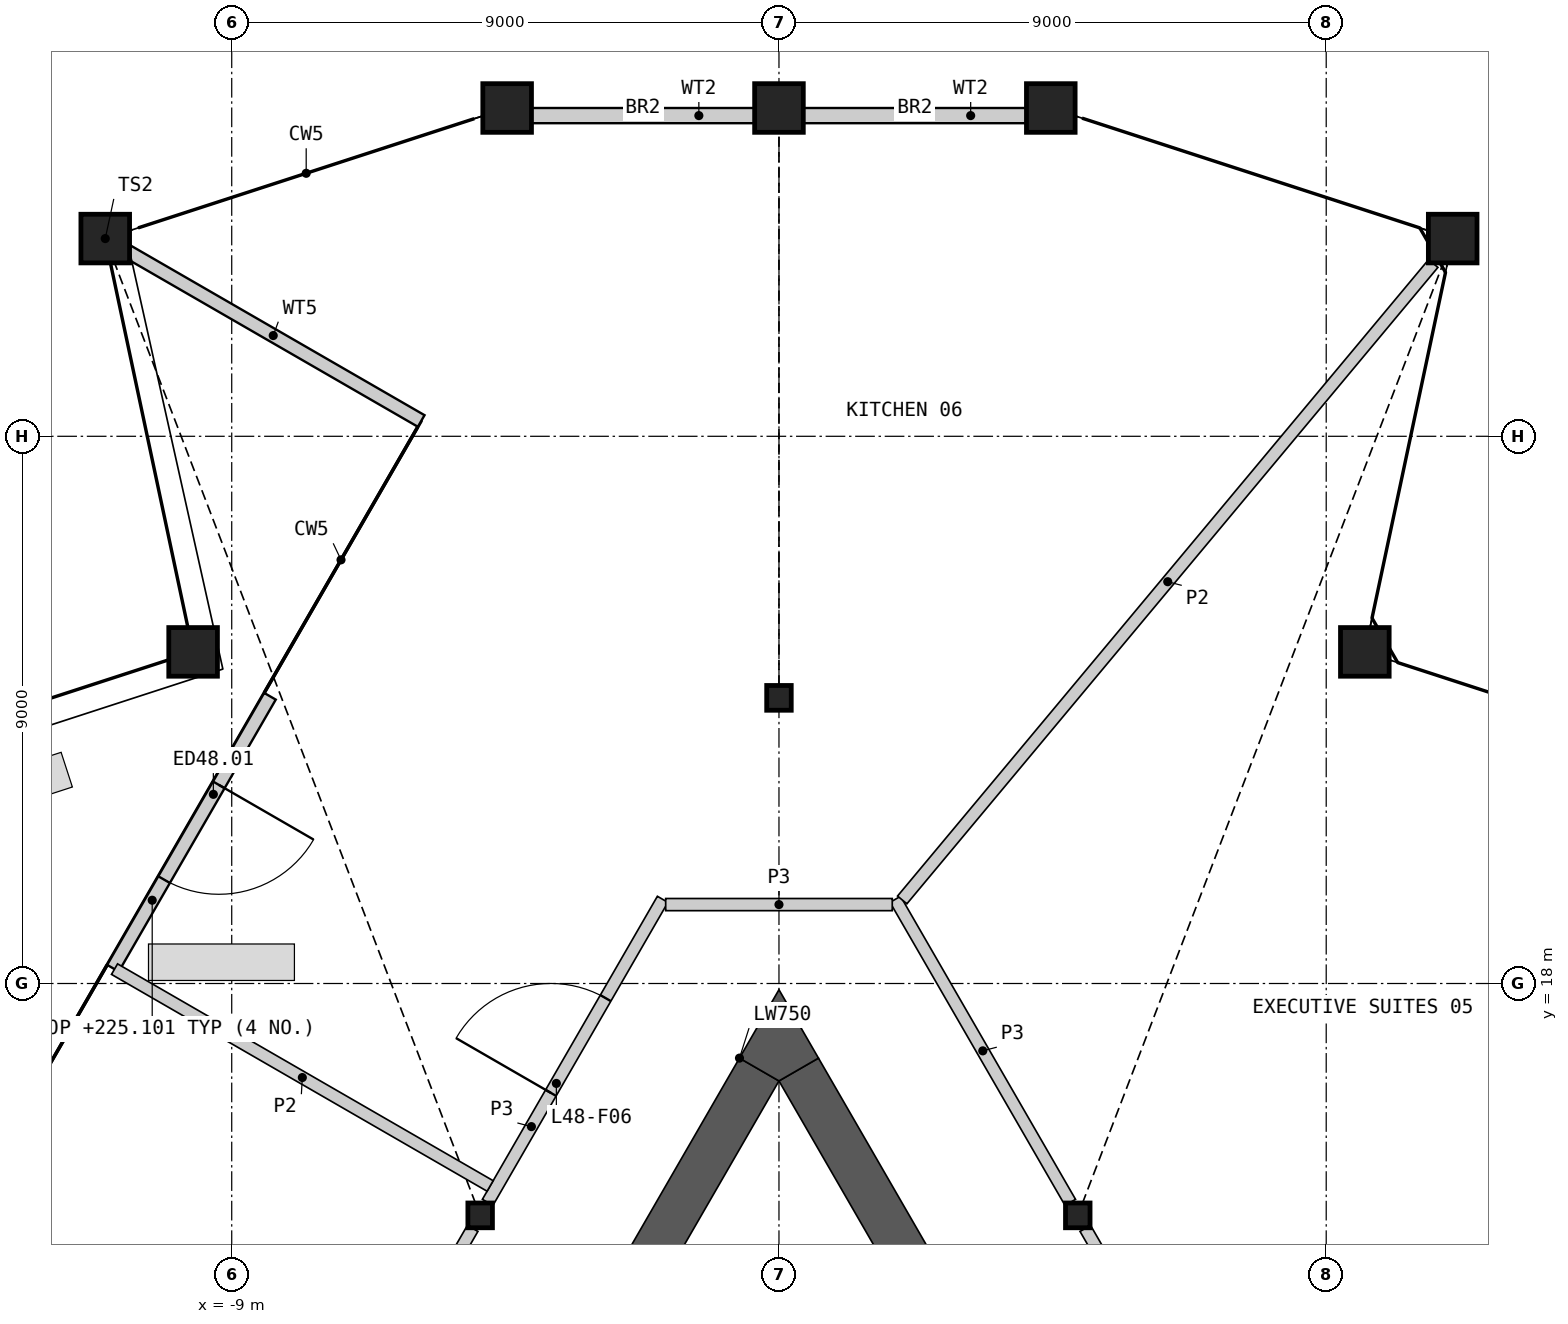
"""IFC4 building model, lengths in metres.
Left out: names, types, materials, properties, quantities, classifications, styles, units other than length and angle.
Written with IfcOpenShell. Run it as: python <this file> out.ifc"""

import sys

from ifc_helpers import new_model, si_unit, direction, frame, frame_2d, origin, origin_2d, place, context, subcontext, project, spatial, polyline, rectangle, hollow_rectangle, i_section, outline, extrude, element, fill, save


model = new_model("IFC4")
c1 = context("Model", 3, precision=1e-05, world=origin(), true_north=direction((0.0, 1.0)))
c2 = subcontext(c1, "Body", "Model", "MODEL_VIEW")
j1 = project(units=[si_unit("LENGTHUNIT", "METRE"), si_unit("PLANEANGLEUNIT", "RADIAN")], contexts=[c1])
p1 = place(None, origin())
s1 = spatial("IfcSite", under=j1, at=p1, CompositionType="ELEMENT")
p2 = place(p1, origin())
s2 = spatial("IfcBuilding", under=s1, at=p2, CompositionType="ELEMENT")
p3 = place(p2, frame((0.0, 0.0, 216.0)))
s3 = spatial("IfcBuildingStorey", under=s2, at=p3, CompositionType="ELEMENT", Elevation=216.0)
for number, where, z_axis, x_axis in (
    (1, (9.635, 23.454, 0.0), (0.0, 0.0, 1.0), (1.0, 0.0, 0.0)),
    (2, (11.08, 30.252, 0.0), (0.0, 0.0, 1.0), (1.0, 0.0, 0.0)),
    (3, (4.47, 32.399, 0.0), (0.0, 0.0, 1.0), (1.0, 0.0, 0.0)),
    (4, (0.0, 32.399, 0.0), (0.0, 0.0, 1.0), (1.0, 0.0, 0.0)),
    (5, (-4.47, 32.399, 0.0), (0.0, 0.0, 1.0), (1.0, 0.0, 0.0)),
    (6, (-11.08, 30.252, 0.0), (0.0, 0.0, 1.0), (1.0, 0.0, 0.0)),
    (7, (-9.635, 23.454, 0.0), (0.0, 0.0, 1.0), (1.0, 0.0, 0.0)),
):
    element("IfcColumn", number, at=place(p3, frame(where, z_axis=z_axis, x_axis=x_axis)), inside=s3, PredefinedType="COLUMN", context=c2, shape_type="SweptSolid", body=[
        extrude(hollow_rectangle(XDim=0.8, YDim=0.8, WallThickness=0.05, at=origin_2d()), origin(), (0.0, 0.0, 1.0), 10.0),
    ])
for number, where, z_axis, x_axis in (
    (8, (0.0, 22.698, 0.0), (0.0, 0.0, 1.0), (1.0, 0.0, 0.0)),
    (9, (-4.914, 14.186, 0.0), (0.0, 0.0, 1.0), (1.0, 0.0, 0.0)),
    (10, (4.914, 14.186, 0.0), (0.0, 0.0, 1.0), (1.0, 0.0, 0.0)),
):
    element("IfcColumn", number, at=place(p3, frame(where, z_axis=z_axis, x_axis=x_axis)), inside=s3, PredefinedType="COLUMN", context=c2, shape_type="SweptSolid", body=[
        extrude(i_section(OverallWidth=0.404, OverallDepth=0.407, WebThickness=0.027, FlangeThickness=0.044, at=origin_2d()), origin(), (0.0, 0.0, 1.0), 10.0),
    ])
for number, where, z_axis, x_axis in (
    (11, (4.07, 32.274, 0.0), (0.0, 0.0, 1.0), (-1.0, 0.0, 0.0)),
    (12, (-0.4, 32.274, 0.0), (0.0, 0.0, 1.0), (-1.0, 0.0, 0.0)),
):
    element("IfcWall", number, at=place(p3, frame(where, z_axis=z_axis, x_axis=x_axis)), inside=s3, PredefinedType="SOLIDWALL", context=c2, shape_type="SweptSolid", body=[
        extrude(rectangle(XDim=3.67, YDim=0.25, at=frame_2d((1.835, 0.0))), origin(), (0.0, 0.0, 1.0), 9.101),
    ])
p4 = place(p3, frame((-8.371, 22.724, 0.0), z_axis=(0.0, 0.0, 1.0), x_axis=(-0.499997981539, -0.86602656914, 0.0)))
e13 = element("IfcWall", 13, at=p4, inside=s3, PredefinedType="SOLIDWALL", context=c2, shape_type="SweptSolid", body=[
    extrude(rectangle(XDim=5.165, YDim=0.22, at=frame_2d((2.582, 0.0))), origin(), (0.0, 0.0, 1.0), 9.101),
])
p5 = place(p4, frame((1.682, 0.0, 0.0)))
e14 = element("IfcOpeningElement", 14, at=p5, cuts=e13, PredefinedType="OPENING", context=c2, shape_type="SweptSolid", body=[
    extrude(rectangle(XDim=1.8, YDim=2.4, at=frame_2d((0.9, 1.2))), frame((0.0, 0.12, 0.0), z_axis=(0.0, -1.0, 0.0), x_axis=(1.0, 0.0, 0.0)), (0.0, 0.0, 1.0), 0.24),
])
p6 = place(p3, frame((-10.751, 30.062, 0.0), z_axis=(0.0, 0.0, 1.0), x_axis=(0.866015577098, -0.500017019934, 0.0)))
e15 = element("IfcWall", 15, at=p6, inside=s3, PredefinedType="SOLIDWALL", context=c2, shape_type="SweptSolid", body=[
    extrude(rectangle(XDim=5.62, YDim=0.22, at=frame_2d((2.81, 0.0))), origin(), (0.0, 0.0, 1.0), 9.101),
])
p7 = place(p3, frame((2.169, 13.391, 0.0), z_axis=(0.0, 0.0, 1.0), x_axis=(-0.500018451642, 0.866014750462, 0.0)))
e16 = element("IfcWall", 16, at=p7, inside=s3, PredefinedType="SHEAR", context=c2, shape_type="SweptSolid", body=[
    extrude(rectangle(XDim=3.689, YDim=0.75, at=frame_2d((1.844, 0.0))), origin(), (0.0, 0.0, 1.0), 9.65),
])
p8 = place(p3, frame((-0.325, 16.585, 0.0), z_axis=(0.0, 0.0, 1.0), x_axis=(-0.500008939514, -0.866020242492, 0.0)))
e17 = element("IfcWall", 17, at=p8, inside=s3, PredefinedType="SHEAR", context=c2, shape_type="SweptSolid", body=[
    extrude(rectangle(XDim=11.901, YDim=0.75, at=frame_2d((5.951, 0.0))), origin(), (0.0, 0.0, 1.0), 9.65),
])
p9 = place(p3, origin())
e18 = element("IfcWall", 18, at=p9, inside=s3, PredefinedType="SHEAR", context=c2, shape_type="SweptSolid", body=[
    extrude(outline(polyline([(-0.649, 16.773), (0.0, 17.898), (0.649, 16.773), (0.0, 16.398), (-0.649, 16.773)])), origin(), (0.0, 0.0, 1.0), 9.65),
])
p10 = place(p3, frame((5.038, 13.972, 0.0), z_axis=(0.0, 0.0, 1.0), x_axis=(0.50000393355, -0.866023132736, 0.0)))
e19 = element("IfcWall", 19, at=p10, inside=s3, PredefinedType="PARTITIONING", context=c2, shape_type="SweptSolid", body=[
    extrude(rectangle(XDim=9.335, YDim=0.2, at=frame_2d((4.667, 0.0))), origin(), (0.0, 0.0, 1.0), 9.65),
])
p11 = place(p10, frame((3.768, 0.0, 0.0)))
e20 = element("IfcOpeningElement", 20, at=p11, cuts=e19, PredefinedType="OPENING", context=c2, shape_type="SweptSolid", body=[
    extrude(rectangle(XDim=1.8, YDim=2.1, at=frame_2d((0.9, 1.05))), frame((0.0, 0.11, 0.0), z_axis=(0.0, -1.0, 0.0), x_axis=(1.0, 0.0, 0.0)), (0.0, 0.0, 1.0), 0.22),
])
p12 = place(p3, frame((-9.705, 5.888, 0.0), z_axis=(0.0, 0.0, 1.0), x_axis=(0.50000393355, 0.866023132736, 0.0)))
e21 = element("IfcWall", 21, at=p12, inside=s3, PredefinedType="PARTITIONING", context=c2, shape_type="SweptSolid", body=[
    extrude(rectangle(XDim=9.335, YDim=0.2, at=frame_2d((4.667, 0.0))), origin(), (0.0, 0.0, 1.0), 9.65),
])
p13 = place(p12, frame((3.768, 0.0, 0.0)))
e22 = element("IfcOpeningElement", 22, at=p13, cuts=e21, PredefinedType="OPENING", context=c2, shape_type="SweptSolid", body=[
    extrude(rectangle(XDim=1.8, YDim=2.1, at=frame_2d((0.9, 1.05))), frame((0.0, 0.11, 0.0), z_axis=(0.0, -1.0, 0.0), x_axis=(1.0, 0.0, 0.0)), (0.0, 0.0, 1.0), 0.22),
])
p14 = place(p3, frame((-4.791, 14.4, 0.0), z_axis=(0.0, 0.0, 1.0), x_axis=(0.50000762079, 0.866021003874, 0.0)))
e23 = element("IfcWall", 23, at=p14, inside=s3, PredefinedType="PARTITIONING", context=c2, shape_type="SweptSolid", body=[
    extrude(rectangle(XDim=5.756, YDim=0.2, at=frame_2d((2.878, 0.0))), origin(), (0.0, 0.0, 1.0), 9.65),
])
p15 = place(p14, frame((2.08, 0.0, 0.0)))
e24 = element("IfcOpeningElement", 24, at=p15, cuts=e23, PredefinedType="OPENING", context=c2, shape_type="SweptSolid", body=[
    extrude(rectangle(XDim=1.8, YDim=2.1, at=frame_2d((0.9, 1.05))), frame((0.0, 0.11, 0.0), z_axis=(0.0, -1.0, 0.0), x_axis=(1.0, 0.0, 0.0)), (0.0, 0.0, 1.0), 0.22),
])
p16 = place(p3, frame((1.913, 19.385, 0.0), z_axis=(0.0, 0.0, 1.0), x_axis=(0.50000762079, -0.866021003874, 0.0)))
e25 = element("IfcWall", 25, at=p16, inside=s3, PredefinedType="PARTITIONING", context=c2, shape_type="SweptSolid", body=[
    extrude(rectangle(XDim=5.756, YDim=0.2, at=frame_2d((2.878, 0.0))), origin(), (0.0, 0.0, 1.0), 9.65),
])
p17 = place(p3, frame((-1.863, 19.298, 0.0), z_axis=(0.0, 0.0, 1.0), x_axis=(1.0, 0.0, 0.0)))
e26 = element("IfcWall", 26, at=p17, inside=s3, PredefinedType="PARTITIONING", context=c2, shape_type="SweptSolid", body=[
    extrude(rectangle(XDim=3.726, YDim=0.2, at=frame_2d((1.863, 0.0))), origin(), (0.0, 0.0, 1.0), 9.65),
])
p18 = place(p3, frame((2.027, 19.375, 0.0), z_axis=(0.0, 0.0, 1.0), x_axis=(0.640645811519, 0.767836534806, 0.0)))
e27 = element("IfcWall", 27, at=p18, inside=s3, PredefinedType="PARTITIONING", context=c2, shape_type="SweptSolid", body=[
    extrude(rectangle(XDim=13.632, YDim=0.2, at=frame_2d((6.816, 0.0))), origin(), (0.0, 0.0, 1.0), 8.804),
])
p19 = place(p3, frame((-10.927, 18.236, 0.0), z_axis=(0.0, 0.0, 1.0), x_axis=(0.866027130588, -0.499997009076, 0.0)))
e28 = element("IfcWall", 28, at=p19, inside=s3, PredefinedType="PARTITIONING", context=c2, shape_type="SweptSolid", body=[
    extrude(rectangle(XDim=7.133, YDim=0.2, at=frame_2d((3.566, 0.0))), origin(), (0.0, 0.0, 1.0), 8.804),
])
p20 = place(p5, origin())
e29 = element("IfcDoor", 29, at=p20, inside=s3, OperationType="DOUBLE_DOOR_SINGLE_SWING", PredefinedType="DOOR", context=c2, shape_type="SweptSolid", body=[
    extrude(rectangle(XDim=1.8, YDim=2.4, at=frame_2d((0.9, 1.2))), frame((0.0, 0.025, 0.0), z_axis=(0.0, -1.0, 0.0), x_axis=(1.0, 0.0, 0.0)), (0.0, 0.0, 1.0), 0.05),
])
fill(e14, e29)
p21 = place(p15, origin())
e30 = element("IfcDoor", 30, at=p21, inside=s3, OperationType="DOUBLE_DOOR_SINGLE_SWING", PredefinedType="DOOR", context=c2, shape_type="SweptSolid", body=[
    extrude(rectangle(XDim=1.8, YDim=2.1, at=frame_2d((0.9, 1.05))), frame((0.0, 0.025, 0.0), z_axis=(0.0, -1.0, 0.0), x_axis=(1.0, 0.0, 0.0)), (0.0, 0.0, 1.0), 0.05),
])
fill(e24, e30)
save(model, sys.argv[1])
